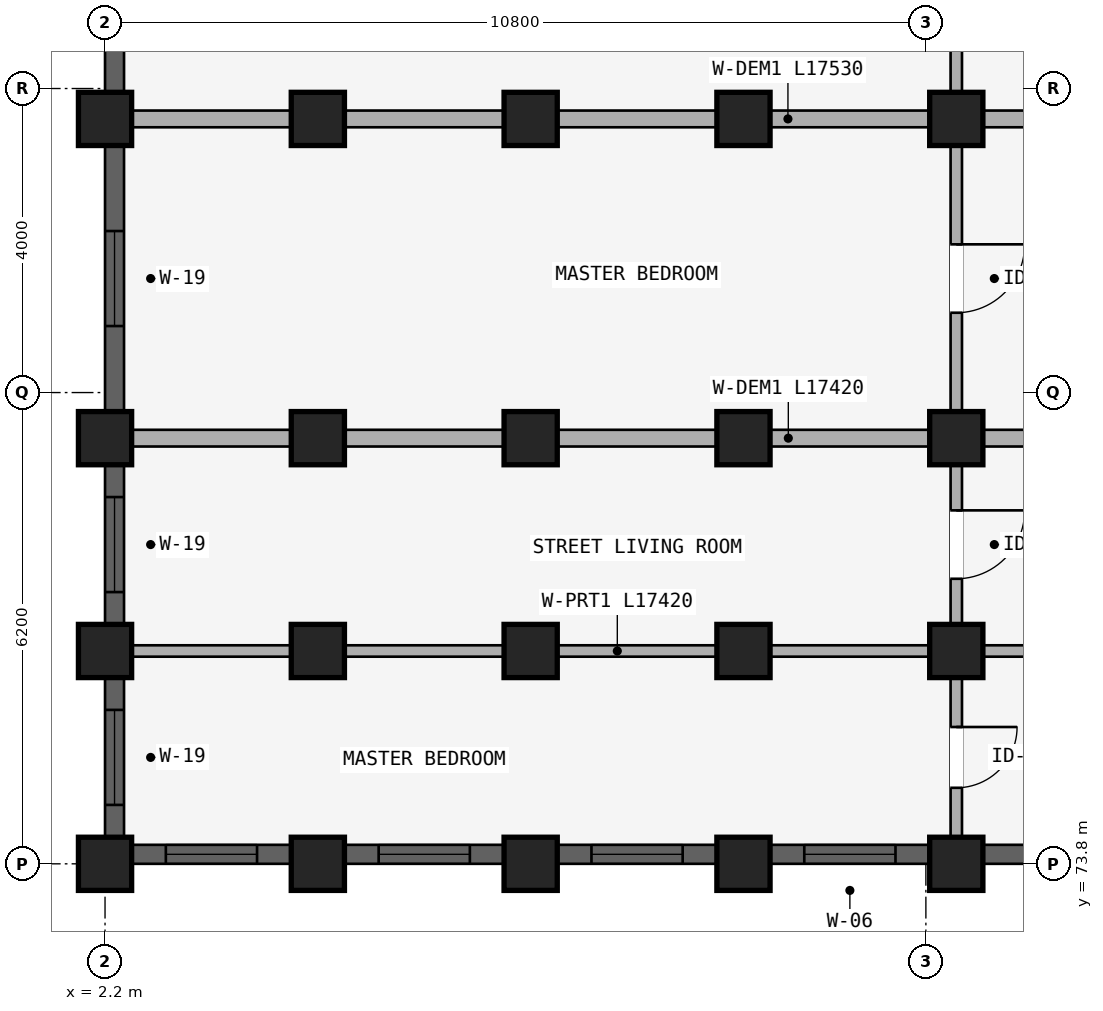
"""IFC4 building model, lengths in metres.
Left out: names, types, materials, properties, quantities, classifications, styles, units other than length and angle.
Written with IfcOpenShell. Run it as: python <this file> out.ifc"""

import sys

from ifc_helpers import new_model, si_unit, direction, frame, frame_2d, origin, origin_2d, place, context, subcontext, project, spatial, rectangle, extrude, element, fill, save


model = new_model("IFC4")
c1 = context("Model", 3, precision=1e-05, world=origin(), true_north=direction((0.0, 1.0)))
c2 = subcontext(c1, "Body", "Model", "MODEL_VIEW")
j1 = project(units=[si_unit("LENGTHUNIT", "METRE"), si_unit("PLANEANGLEUNIT", "RADIAN")], contexts=[c1])
p1 = place(None, origin())
s1 = spatial("IfcSite", under=j1, at=p1, CompositionType="ELEMENT")
p2 = place(p1, origin())
s2 = spatial("IfcBuilding", under=s1, at=p2, CompositionType="ELEMENT")
p3 = place(p2, frame((0.0, 0.0, 24.45)))
s3 = spatial("IfcBuildingStorey", under=s2, at=p3, CompositionType="ELEMENT", Elevation=24.45)
for number, where, z_axis, x_axis in (
    (1, (13.4, 83.6, 0.0), (0.0, 0.0, 1.0), (1.0, 0.0, 0.0)),
    (2, (10.6, 83.6, 0.0), (0.0, 0.0, 1.0), (1.0, 0.0, 0.0)),
    (3, (7.8, 83.6, 0.0), (0.0, 0.0, 1.0), (1.0, 0.0, 0.0)),
    (4, (5.0, 83.6, 0.0), (0.0, 0.0, 1.0), (1.0, 0.0, 0.0)),
    (5, (2.2, 83.6, 0.0), (0.0, 0.0, 1.0), (1.0, 0.0, 0.0)),
    (6, (13.4, 79.4, 0.0), (0.0, 0.0, 1.0), (1.0, 0.0, 0.0)),
    (7, (10.6, 79.4, 0.0), (0.0, 0.0, 1.0), (1.0, 0.0, 0.0)),
    (8, (7.8, 79.4, 0.0), (0.0, 0.0, 1.0), (1.0, 0.0, 0.0)),
    (9, (5.0, 79.4, 0.0), (0.0, 0.0, 1.0), (1.0, 0.0, 0.0)),
    (10, (2.2, 79.4, 0.0), (0.0, 0.0, 1.0), (1.0, 0.0, 0.0)),
    (11, (13.4, 76.6, 0.0), (0.0, 0.0, 1.0), (1.0, 0.0, 0.0)),
    (12, (10.6, 76.6, 0.0), (0.0, 0.0, 1.0), (1.0, 0.0, 0.0)),
    (13, (7.8, 76.6, 0.0), (0.0, 0.0, 1.0), (1.0, 0.0, 0.0)),
    (14, (5.0, 76.6, 0.0), (0.0, 0.0, 1.0), (1.0, 0.0, 0.0)),
    (15, (2.2, 76.6, 0.0), (0.0, 0.0, 1.0), (1.0, 0.0, 0.0)),
):
    element("IfcColumn", number, at=place(p3, frame(where, z_axis=z_axis, x_axis=x_axis)), inside=s3, PredefinedType="COLUMN", context=c2, shape_type="SweptSolid", body=[
        extrude(rectangle(XDim=0.7, YDim=0.7, at=origin_2d()), origin(), (0.0, 0.0, 1.0), 2.93),
    ])
for number, where, z_axis, x_axis in (
    (16, (13.4, 73.8, 0.0), (0.0, 0.0, 1.0), (1.0, 0.0, 0.0)),
    (17, (10.6, 73.8, 0.0), (0.0, 0.0, 1.0), (1.0, 0.0, 0.0)),
    (18, (7.8, 73.8, 0.0), (0.0, 0.0, 1.0), (1.0, 0.0, 0.0)),
    (19, (5.0, 73.8, 0.0), (0.0, 0.0, 1.0), (1.0, 0.0, 0.0)),
    (20, (2.2, 73.8, 0.0), (0.0, 0.0, 1.0), (1.0, 0.0, 0.0)),
):
    element("IfcColumn", number, at=place(p3, frame(where, z_axis=z_axis, x_axis=x_axis)), inside=s3, PredefinedType="COLUMN", context=c2, shape_type="SweptSolid", body=[
        extrude(rectangle(XDim=0.7, YDim=0.7, at=origin_2d()), origin(), (0.0, 0.0, 1.0), 2.97),
    ])
p4 = place(p3, frame((13.4, 87.57, 0.0), z_axis=(0.0, 0.0, 1.0), x_axis=(0.0, -1.0, 0.0)))
e21 = element("IfcWall", 21, at=p4, inside=s3, PredefinedType="PARTITIONING", context=c2, shape_type="SweptSolid", body=[
    extrude(rectangle(XDim=3.89, YDim=0.15, at=frame_2d((1.945, 0.0))), origin(), (0.0, 0.0, 1.0), 2.372),
])
p5 = place(p4, frame((1.495, 0.0, 0.0)))
e22 = element("IfcOpeningElement", 22, at=p5, cuts=e21, PredefinedType="OPENING", context=c2, shape_type="SweptSolid", body=[
    extrude(rectangle(XDim=0.9, YDim=2.1, at=frame_2d((0.45, 1.05))), frame((0.0, 0.085, 0.0), z_axis=(0.0, -1.0, 0.0), x_axis=(1.0, 0.0, 0.0)), (0.0, 0.0, 1.0), 0.17),
])
p6 = place(p3, frame((13.4, 83.52, 0.0), z_axis=(0.0, 0.0, 1.0), x_axis=(0.0, -1.0, 0.0)))
e23 = element("IfcWall", 23, at=p6, inside=s3, PredefinedType="PARTITIONING", context=c2, shape_type="SweptSolid", body=[
    extrude(rectangle(XDim=4.04, YDim=0.15, at=frame_2d((2.02, 0.0))), origin(), (0.0, 0.0, 1.0), 2.372),
])
p7 = place(p6, frame((1.57, 0.0, 0.0)))
e24 = element("IfcOpeningElement", 24, at=p7, cuts=e23, PredefinedType="OPENING", context=c2, shape_type="SweptSolid", body=[
    extrude(rectangle(XDim=0.9, YDim=2.1, at=frame_2d((0.45, 1.05))), frame((0.0, 0.085, 0.0), z_axis=(0.0, -1.0, 0.0), x_axis=(1.0, 0.0, 0.0)), (0.0, 0.0, 1.0), 0.17),
])
p8 = place(p3, frame((19.95, 83.6, 0.0), z_axis=(0.0, 0.0, 1.0), x_axis=(-1.0, 0.0, 0.0)))
e25 = element("IfcWall", 25, at=p8, inside=s3, PredefinedType="STANDARD", context=c2, shape_type="SweptSolid", body=[
    extrude(rectangle(XDim=17.53, YDim=0.22, at=frame_2d((8.765, 0.0))), origin(), (0.0, 0.0, 1.0), 2.372),
])
p9 = place(p3, frame((13.4, 79.32, 0.0), z_axis=(0.0, 0.0, 1.0), x_axis=(0.0, -1.0, 0.0)))
e26 = element("IfcWall", 26, at=p9, inside=s3, PredefinedType="PLUMBINGWALL", context=c2, shape_type="SweptSolid", body=[
    extrude(rectangle(XDim=2.64, YDim=0.15, at=frame_2d((1.32, 0.0))), origin(), (0.0, 0.0, 1.0), 2.372),
])
p10 = place(p9, frame((0.87, 0.0, 0.0)))
e27 = element("IfcOpeningElement", 27, at=p10, cuts=e26, PredefinedType="OPENING", context=c2, shape_type="SweptSolid", body=[
    extrude(rectangle(XDim=0.9, YDim=2.1, at=frame_2d((0.45, 1.05))), frame((0.0, 0.085, 0.0), z_axis=(0.0, -1.0, 0.0), x_axis=(1.0, 0.0, 0.0)), (0.0, 0.0, 1.0), 0.17),
])
p11 = place(p3, frame((19.9, 79.4, 0.0), z_axis=(0.0, 0.0, 1.0), x_axis=(-1.0, 0.0, 0.0)))
e28 = element("IfcWall", 28, at=p11, inside=s3, PredefinedType="STANDARD", context=c2, shape_type="SweptSolid", body=[
    extrude(rectangle(XDim=17.42, YDim=0.22, at=frame_2d((8.71, 0.0))), origin(), (0.0, 0.0, 1.0), 2.372),
])
p12 = place(p3, frame((13.4, 76.52, 0.0), z_axis=(0.0, 0.0, 1.0), x_axis=(0.0, -1.0, 0.0)))
e29 = element("IfcWall", 29, at=p12, inside=s3, PredefinedType="PLUMBINGWALL", context=c2, shape_type="SweptSolid", body=[
    extrude(rectangle(XDim=2.64, YDim=0.15, at=frame_2d((1.32, 0.0))), origin(), (0.0, 0.0, 1.0), 2.372),
])
p13 = place(p12, frame((0.92, 0.0, 0.0)))
e30 = element("IfcOpeningElement", 30, at=p13, cuts=e29, PredefinedType="OPENING", context=c2, shape_type="SweptSolid", body=[
    extrude(rectangle(XDim=0.8, YDim=2.1, at=frame_2d((0.4, 1.05))), frame((0.0, 0.085, 0.0), z_axis=(0.0, -1.0, 0.0), x_axis=(1.0, 0.0, 0.0)), (0.0, 0.0, 1.0), 0.17),
])
p14 = place(p3, frame((19.9, 76.6, 0.0), z_axis=(0.0, 0.0, 1.0), x_axis=(-1.0, 0.0, 0.0)))
e31 = element("IfcWall", 31, at=p14, inside=s3, PredefinedType="PARTITIONING", context=c2, shape_type="SweptSolid", body=[
    extrude(rectangle(XDim=17.42, YDim=0.15, at=frame_2d((8.71, 0.0))), origin(), (0.0, 0.0, 1.0), 2.372),
])
p15 = place(p14, frame((2.75, 0.0, 0.0)))
e32 = element("IfcOpeningElement", 32, at=p15, cuts=e31, PredefinedType="OPENING", context=c2, shape_type="SweptSolid", body=[
    extrude(rectangle(XDim=0.9, YDim=2.1, at=frame_2d((0.45, 1.05))), frame((0.0, 0.085, 0.0), z_axis=(0.0, -1.0, 0.0), x_axis=(1.0, 0.0, 0.0)), (0.0, 0.0, 1.0), 0.17),
])
p16 = place(p3, frame((2.325, 87.447, 0.0), z_axis=(0.0, 0.0, 1.0), x_axis=(0.0, -1.0, 0.0)))
e33 = element("IfcWall", 33, at=p16, inside=s3, PredefinedType="STANDARD", context=c2, shape_type="SweptSolid", body=[
    extrude(rectangle(XDim=3.493, YDim=0.25, at=frame_2d((1.747, 0.0))), origin(), (0.0, 0.0, 1.0), 2.472),
])
p17 = place(p16, frame((1.122, 0.0, 0.722)))
e34 = element("IfcOpeningElement", 34, at=p17, cuts=e33, PredefinedType="OPENING", context=c2, shape_type="SweptSolid", body=[
    extrude(rectangle(XDim=1.25, YDim=1.55, at=frame_2d((0.625, 0.775))), frame((0.0, 0.135, 0.0), z_axis=(0.0, -1.0, 0.0), x_axis=(1.0, 0.0, 0.0)), (0.0, 0.0, 1.0), 0.27),
])
p18 = place(p3, frame((2.325, 83.247, 0.0), z_axis=(0.0, 0.0, 1.0), x_axis=(0.0, -1.0, 0.0)))
e35 = element("IfcWall", 35, at=p18, inside=s3, PredefinedType="STANDARD", context=c2, shape_type="SweptSolid", body=[
    extrude(rectangle(XDim=3.493, YDim=0.25, at=frame_2d((1.747, 0.0))), origin(), (0.0, 0.0, 1.0), 2.472),
])
p19 = place(p18, frame((1.122, 0.0, 0.722)))
e36 = element("IfcOpeningElement", 36, at=p19, cuts=e35, PredefinedType="OPENING", context=c2, shape_type="SweptSolid", body=[
    extrude(rectangle(XDim=1.25, YDim=1.55, at=frame_2d((0.625, 0.775))), frame((0.0, 0.135, 0.0), z_axis=(0.0, -1.0, 0.0), x_axis=(1.0, 0.0, 0.0)), (0.0, 0.0, 1.0), 0.27),
])
p20 = place(p3, frame((2.325, 79.046, 0.0), z_axis=(0.0, 0.0, 1.0), x_axis=(0.0, -1.0, 0.0)))
e37 = element("IfcWall", 37, at=p20, inside=s3, PredefinedType="STANDARD", context=c2, shape_type="SweptSolid", body=[
    extrude(rectangle(XDim=2.093, YDim=0.25, at=frame_2d((1.046, 0.0))), origin(), (0.0, 0.0, 1.0), 2.472),
])
p21 = place(p20, frame((0.421, 0.0, 0.722)))
e38 = element("IfcOpeningElement", 38, at=p21, cuts=e37, PredefinedType="OPENING", context=c2, shape_type="SweptSolid", body=[
    extrude(rectangle(XDim=1.25, YDim=1.55, at=frame_2d((0.625, 0.775))), frame((0.0, 0.135, 0.0), z_axis=(0.0, -1.0, 0.0), x_axis=(1.0, 0.0, 0.0)), (0.0, 0.0, 1.0), 0.27),
])
p22 = place(p3, frame((2.325, 76.247, 0.0), z_axis=(0.0, 0.0, 1.0), x_axis=(0.0, -1.0, 0.0)))
e39 = element("IfcWall", 39, at=p22, inside=s3, PredefinedType="STANDARD", context=c2, shape_type="SweptSolid", body=[
    extrude(rectangle(XDim=2.093, YDim=0.25, at=frame_2d((1.046, 0.0))), origin(), (0.0, 0.0, 1.0), 2.472),
])
p23 = place(p22, frame((0.421, 0.0, 0.722)))
e40 = element("IfcOpeningElement", 40, at=p23, cuts=e39, PredefinedType="OPENING", context=c2, shape_type="SweptSolid", body=[
    extrude(rectangle(XDim=1.25, YDim=1.55, at=frame_2d((0.625, 0.775))), frame((0.0, 0.135, 0.0), z_axis=(0.0, -1.0, 0.0), x_axis=(1.0, 0.0, 0.0)), (0.0, 0.0, 1.0), 0.27),
])
p24 = place(p3, frame((19.771, 73.925, 0.0), z_axis=(0.0, 0.0, 1.0), x_axis=(-1.0, 0.0, 0.0)))
e41 = element("IfcWall", 41, at=p24, inside=s3, PredefinedType="STANDARD", context=c2, shape_type="SweptSolid", body=[
    extrude(rectangle(XDim=6.018, YDim=0.25, at=frame_2d((3.009, 0.0))), origin(), (0.0, 0.0, 1.0), 2.372),
])
p25 = place(p24, frame((2.322, 0.0, 0.522)))
e42 = element("IfcOpeningElement", 42, at=p25, cuts=e41, PredefinedType="OPENING", context=c2, shape_type="SweptSolid", body=[
    extrude(rectangle(XDim=1.5, YDim=1.65, at=frame_2d((0.75, 0.825))), frame((0.0, 0.135, 0.0), z_axis=(0.0, -1.0, 0.0), x_axis=(1.0, 0.0, 0.0)), (0.0, 0.0, 1.0), 0.27),
])
p26 = place(p3, frame((13.046, 73.925, 0.0), z_axis=(0.0, 0.0, 1.0), x_axis=(-1.0, 0.0, 0.0)))
e43 = element("IfcWall", 43, at=p26, inside=s3, PredefinedType="STANDARD", context=c2, shape_type="SweptSolid", body=[
    extrude(rectangle(XDim=2.093, YDim=0.25, at=frame_2d((1.046, 0.0))), origin(), (0.0, 0.0, 1.0), 2.372),
])
p27 = place(p26, frame((0.447, 0.0, 0.672)))
e44 = element("IfcOpeningElement", 44, at=p27, cuts=e43, PredefinedType="OPENING", context=c2, shape_type="SweptSolid", body=[
    extrude(rectangle(XDim=1.2, YDim=1.5, at=frame_2d((0.6, 0.75))), frame((0.0, 0.135, 0.0), z_axis=(0.0, -1.0, 0.0), x_axis=(1.0, 0.0, 0.0)), (0.0, 0.0, 1.0), 0.27),
])
p28 = place(p3, frame((10.247, 73.925, 0.0), z_axis=(0.0, 0.0, 1.0), x_axis=(-1.0, 0.0, 0.0)))
e45 = element("IfcWall", 45, at=p28, inside=s3, PredefinedType="STANDARD", context=c2, shape_type="SweptSolid", body=[
    extrude(rectangle(XDim=2.093, YDim=0.25, at=frame_2d((1.046, 0.0))), origin(), (0.0, 0.0, 1.0), 2.372),
])
p29 = place(p28, frame((0.447, 0.0, 0.672)))
e46 = element("IfcOpeningElement", 46, at=p29, cuts=e45, PredefinedType="OPENING", context=c2, shape_type="SweptSolid", body=[
    extrude(rectangle(XDim=1.2, YDim=1.5, at=frame_2d((0.6, 0.75))), frame((0.0, 0.135, 0.0), z_axis=(0.0, -1.0, 0.0), x_axis=(1.0, 0.0, 0.0)), (0.0, 0.0, 1.0), 0.27),
])
p30 = place(p3, frame((7.447, 73.925, 0.0), z_axis=(0.0, 0.0, 1.0), x_axis=(-1.0, 0.0, 0.0)))
e47 = element("IfcWall", 47, at=p30, inside=s3, PredefinedType="STANDARD", context=c2, shape_type="SweptSolid", body=[
    extrude(rectangle(XDim=2.093, YDim=0.25, at=frame_2d((1.046, 0.0))), origin(), (0.0, 0.0, 1.0), 2.372),
])
p31 = place(p30, frame((0.447, 0.0, 0.672)))
e48 = element("IfcOpeningElement", 48, at=p31, cuts=e47, PredefinedType="OPENING", context=c2, shape_type="SweptSolid", body=[
    extrude(rectangle(XDim=1.2, YDim=1.5, at=frame_2d((0.6, 0.75))), frame((0.0, 0.135, 0.0), z_axis=(0.0, -1.0, 0.0), x_axis=(1.0, 0.0, 0.0)), (0.0, 0.0, 1.0), 0.27),
])
p32 = place(p3, frame((4.646, 73.925, 0.0), z_axis=(0.0, 0.0, 1.0), x_axis=(-1.0, 0.0, 0.0)))
e49 = element("IfcWall", 49, at=p32, inside=s3, PredefinedType="STANDARD", context=c2, shape_type="SweptSolid", body=[
    extrude(rectangle(XDim=2.093, YDim=0.25, at=frame_2d((1.046, 0.0))), origin(), (0.0, 0.0, 1.0), 2.372),
])
p33 = place(p32, frame((0.447, 0.0, 0.672)))
e50 = element("IfcOpeningElement", 50, at=p33, cuts=e49, PredefinedType="OPENING", context=c2, shape_type="SweptSolid", body=[
    extrude(rectangle(XDim=1.2, YDim=1.5, at=frame_2d((0.6, 0.75))), frame((0.0, 0.135, 0.0), z_axis=(0.0, -1.0, 0.0), x_axis=(1.0, 0.0, 0.0)), (0.0, 0.0, 1.0), 0.27),
])
p34 = place(p19, origin())
e51 = element("IfcWindow", 51, at=p34, inside=s3, PartitioningType="SINGLE_PANEL", PredefinedType="WINDOW", context=c2, shape_type="SweptSolid", body=[
    extrude(rectangle(XDim=1.25, YDim=1.55, at=frame_2d((0.625, 0.775))), frame((0.0, 0.03, 0.0), z_axis=(0.0, -1.0, 0.0), x_axis=(1.0, 0.0, 0.0)), (0.0, 0.0, 1.0), 0.06),
])
fill(e36, e51)
p35 = place(p21, origin())
e52 = element("IfcWindow", 52, at=p35, inside=s3, PartitioningType="SINGLE_PANEL", PredefinedType="WINDOW", context=c2, shape_type="SweptSolid", body=[
    extrude(rectangle(XDim=1.25, YDim=1.55, at=frame_2d((0.625, 0.775))), frame((0.0, 0.03, 0.0), z_axis=(0.0, -1.0, 0.0), x_axis=(1.0, 0.0, 0.0)), (0.0, 0.0, 1.0), 0.06),
])
fill(e38, e52)
p36 = place(p23, origin())
e53 = element("IfcWindow", 53, at=p36, inside=s3, PartitioningType="SINGLE_PANEL", PredefinedType="WINDOW", context=c2, shape_type="SweptSolid", body=[
    extrude(rectangle(XDim=1.25, YDim=1.55, at=frame_2d((0.625, 0.775))), frame((0.0, 0.03, 0.0), z_axis=(0.0, -1.0, 0.0), x_axis=(1.0, 0.0, 0.0)), (0.0, 0.0, 1.0), 0.06),
])
fill(e40, e53)
p37 = place(p27, origin())
e54 = element("IfcWindow", 54, at=p37, inside=s3, PartitioningType="SINGLE_PANEL", PredefinedType="WINDOW", context=c2, shape_type="SweptSolid", body=[
    extrude(rectangle(XDim=1.2, YDim=1.5, at=frame_2d((0.6, 0.75))), frame((0.0, 0.03, 0.0), z_axis=(0.0, -1.0, 0.0), x_axis=(1.0, 0.0, 0.0)), (0.0, 0.0, 1.0), 0.06),
])
fill(e44, e54)
p38 = place(p29, origin())
e55 = element("IfcWindow", 55, at=p38, inside=s3, PartitioningType="SINGLE_PANEL", PredefinedType="WINDOW", context=c2, shape_type="SweptSolid", body=[
    extrude(rectangle(XDim=1.2, YDim=1.5, at=frame_2d((0.6, 0.75))), frame((0.0, 0.03, 0.0), z_axis=(0.0, -1.0, 0.0), x_axis=(1.0, 0.0, 0.0)), (0.0, 0.0, 1.0), 0.06),
])
fill(e46, e55)
p39 = place(p31, origin())
e56 = element("IfcWindow", 56, at=p39, inside=s3, PartitioningType="SINGLE_PANEL", PredefinedType="WINDOW", context=c2, shape_type="SweptSolid", body=[
    extrude(rectangle(XDim=1.2, YDim=1.5, at=frame_2d((0.6, 0.75))), frame((0.0, 0.03, 0.0), z_axis=(0.0, -1.0, 0.0), x_axis=(1.0, 0.0, 0.0)), (0.0, 0.0, 1.0), 0.06),
])
fill(e48, e56)
p40 = place(p33, origin())
e57 = element("IfcWindow", 57, at=p40, inside=s3, PartitioningType="SINGLE_PANEL", PredefinedType="WINDOW", context=c2, shape_type="SweptSolid", body=[
    extrude(rectangle(XDim=1.2, YDim=1.5, at=frame_2d((0.6, 0.75))), frame((0.0, 0.03, 0.0), z_axis=(0.0, -1.0, 0.0), x_axis=(1.0, 0.0, 0.0)), (0.0, 0.0, 1.0), 0.06),
])
fill(e50, e57)
p41 = place(p7, frame((0.9, 0.0, 0.0), z_axis=(0.0, 0.0, 1.0), x_axis=(-1.0, 0.0, 0.0)))
e58 = element("IfcDoor", 58, at=p41, inside=s3, OperationType="SINGLE_SWING_RIGHT", PredefinedType="DOOR", context=c2, shape_type="SweptSolid", body=[
    extrude(rectangle(XDim=0.9, YDim=2.1, at=frame_2d((0.45, 1.05))), frame((0.0, 0.025, 0.0), z_axis=(0.0, -1.0, 0.0), x_axis=(1.0, 0.0, 0.0)), (0.0, 0.0, 1.0), 0.05),
])
fill(e24, e58)
p42 = place(p10, frame((0.9, 0.0, 0.0), z_axis=(0.0, 0.0, 1.0), x_axis=(-1.0, 0.0, 0.0)))
e59 = element("IfcDoor", 59, at=p42, inside=s3, OperationType="SINGLE_SWING_RIGHT", PredefinedType="DOOR", context=c2, shape_type="SweptSolid", body=[
    extrude(rectangle(XDim=0.9, YDim=2.1, at=frame_2d((0.45, 1.05))), frame((0.0, 0.025, 0.0), z_axis=(0.0, -1.0, 0.0), x_axis=(1.0, 0.0, 0.0)), (0.0, 0.0, 1.0), 0.05),
])
fill(e27, e59)
p43 = place(p13, frame((0.8, 0.0, 0.0), z_axis=(0.0, 0.0, 1.0), x_axis=(-1.0, 0.0, 0.0)))
e60 = element("IfcDoor", 60, at=p43, inside=s3, OperationType="SINGLE_SWING_RIGHT", PredefinedType="DOOR", context=c2, shape_type="SweptSolid", body=[
    extrude(rectangle(XDim=0.8, YDim=2.1, at=frame_2d((0.4, 1.05))), frame((0.0, 0.025, 0.0), z_axis=(0.0, -1.0, 0.0), x_axis=(1.0, 0.0, 0.0)), (0.0, 0.0, 1.0), 0.05),
])
fill(e30, e60)
save(model, sys.argv[1])
